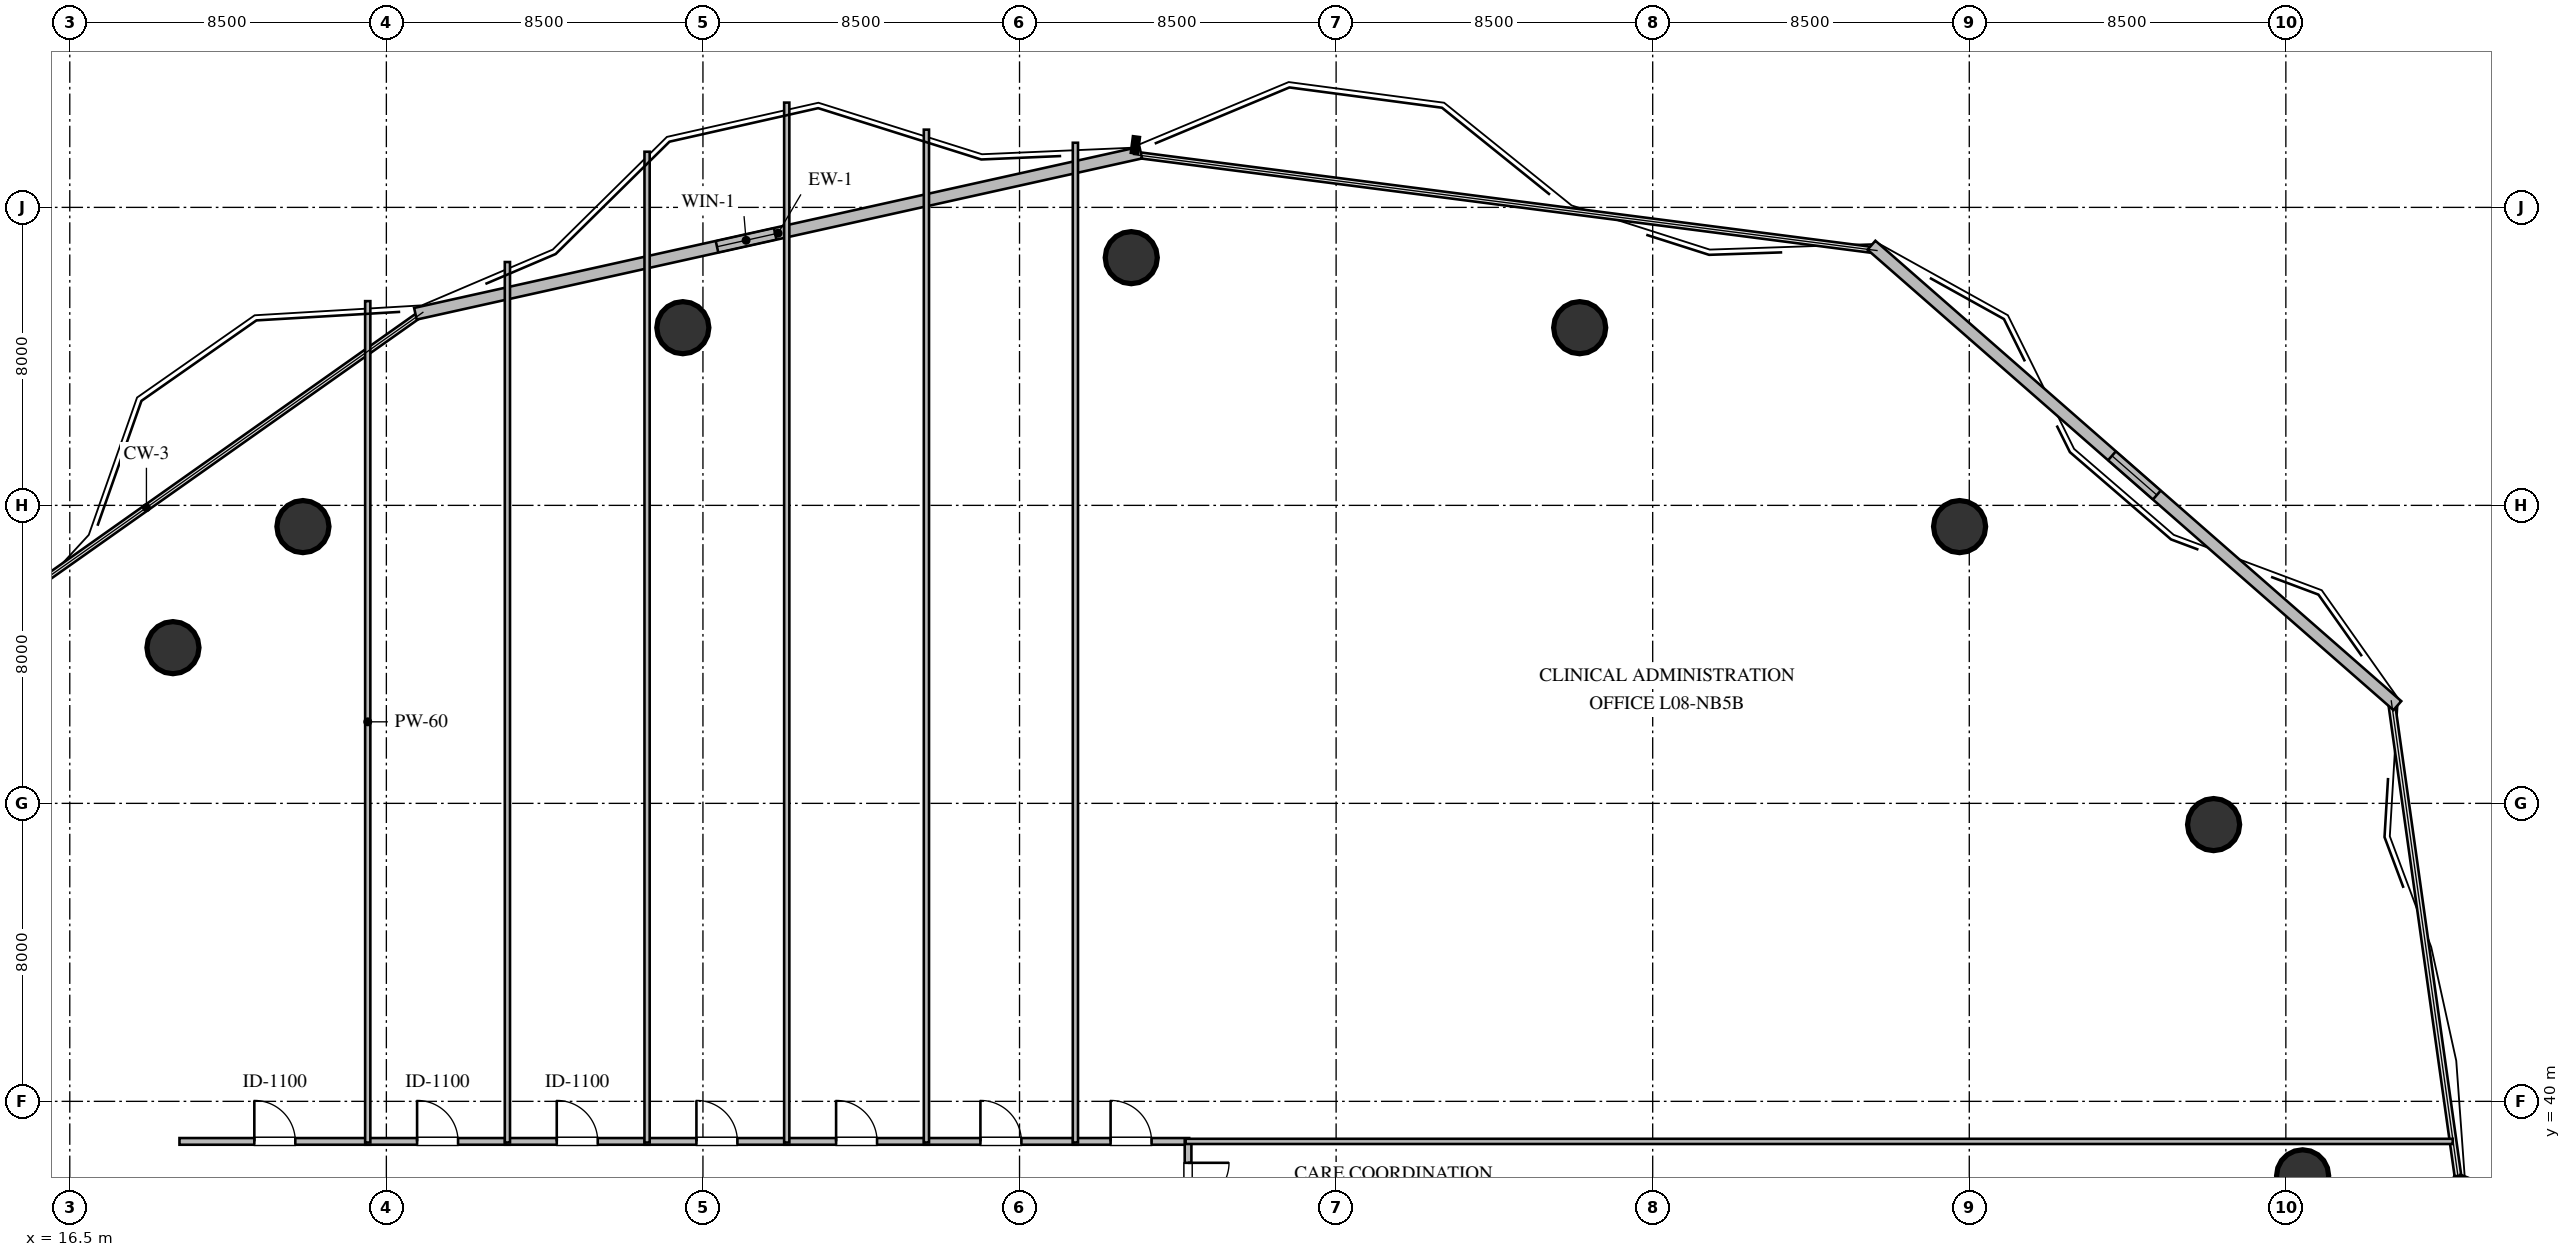
"""IFC4 building model, lengths in metres.
Left out: names, types, materials, properties, quantities, classifications, styles, units other than length and angle.
Written with IfcOpenShell. Run it as: python <this file> out.ifc"""

import sys

from ifc_helpers import new_model, si_unit, direction, frame, frame_2d, origin, origin_2d, place, context, subcontext, project, spatial, rectangle, circle, extrude, element, fill, save


model = new_model("IFC4")
c1 = context("Model", 3, precision=1e-05, world=origin(), true_north=direction((0.0, 1.0)))
c2 = subcontext(c1, "Body", "Model", "MODEL_VIEW")
j1 = project(units=[si_unit("LENGTHUNIT", "METRE"), si_unit("PLANEANGLEUNIT", "RADIAN")], contexts=[c1])
p1 = place(None, origin())
s1 = spatial("IfcSite", under=j1, at=p1, CompositionType="ELEMENT")
p2 = place(p1, origin())
s2 = spatial("IfcBuilding", under=s1, at=p2, CompositionType="ELEMENT")
p3 = place(p2, frame((0.0, 0.0, 34.8)))
s3 = spatial("IfcBuildingStorey", under=s2, at=p3, CompositionType="ELEMENT", Elevation=34.8)
for number, where, z_axis, x_axis in (
    (1, (76.45, 38.0, 0.0), (0.0, 0.0, 1.0), (1.0, 0.0, 0.0)),
    (2, (74.06, 47.43, 0.0), (0.0, 0.0, 1.0), (1.0, 0.0, 0.0)),
    (3, (67.24, 55.43, 0.0), (0.0, 0.0, 1.0), (1.0, 0.0, 0.0)),
    (4, (57.04, 60.77, 0.0), (0.0, 0.0, 1.0), (1.0, 0.0, 0.0)),
    (5, (45.0, 62.65, 0.0), (0.0, 0.0, 1.0), (1.0, 0.0, 0.0)),
    (6, (32.96, 60.77, 0.0), (0.0, 0.0, 1.0), (1.0, 0.0, 0.0)),
    (7, (22.76, 55.43, 0.0), (0.0, 0.0, 1.0), (1.0, 0.0, 0.0)),
    (8, (19.27, 52.18, 0.0), (0.0, 0.0, 1.0), (1.0, 0.0, 0.0)),
):
    element("IfcColumn", number, at=place(p3, frame(where, z_axis=z_axis, x_axis=x_axis)), inside=s3, PredefinedType="COLUMN", context=c2, shape_type="SweptSolid", body=[
        extrude(circle(Radius=0.7, at=origin_2d()), origin(), (0.0, 0.0, 1.0), 3.6),
    ])
p4 = place(p3, frame((25.78, 61.144, 0.0), z_axis=(0.0, 0.0, 1.0), x_axis=(0.976206349039, 0.216843639742, 0.0)))
e9 = element("IfcWall", 9, at=p4, inside=s3, PredefinedType="STANDARD", context=c2, shape_type="SweptSolid", body=[
    extrude(rectangle(XDim=19.949, YDim=0.32, at=frame_2d((9.975, 0.0))), origin(), (0.0, 0.0, 1.0), 3.36),
])
p5 = place(p4, frame((8.295, 0.0, 1.05)))
e10 = element("IfcOpeningElement", 10, at=p5, cuts=e9, PredefinedType="OPENING", context=c2, shape_type="SweptSolid", body=[
    extrude(rectangle(XDim=1.6, YDim=1.5, at=frame_2d((0.8, 0.75))), frame((0.0, 0.17, 0.0), z_axis=(0.0, -1.0, 0.0), x_axis=(1.0, 0.0, 0.0)), (0.0, 0.0, 1.0), 0.34),
])
p6 = place(p3, frame((64.874, 62.984, 0.0), z_axis=(0.0, 0.0, 1.0), x_axis=(0.752445311183, -0.658654730249, 0.0)))
e11 = element("IfcWall", 11, at=p6, inside=s3, PredefinedType="STANDARD", context=c2, shape_type="SweptSolid", body=[
    extrude(rectangle(XDim=18.765, YDim=0.32, at=frame_2d((9.383, 0.0))), origin(), (0.0, 0.0, 1.0), 3.36),
])
p7 = place(p6, frame((8.582, 0.0, 1.05)))
e12 = element("IfcOpeningElement", 12, at=p7, cuts=e11, PredefinedType="OPENING", context=c2, shape_type="SweptSolid", body=[
    extrude(rectangle(XDim=1.6, YDim=1.5, at=frame_2d((0.8, 0.75))), frame((0.0, 0.17, 0.0), z_axis=(0.0, -1.0, 0.0), x_axis=(1.0, 0.0, 0.0)), (0.0, 0.0, 1.0), 0.34),
])
p8 = place(p3, frame((19.445, 38.925, 0.0), z_axis=(0.0, 0.0, 1.0), x_axis=(1.0, 0.0, 0.0)))
e13 = element("IfcWall", 13, at=p8, inside=s3, PredefinedType="PARTITIONING", context=c2, shape_type="SweptSolid", body=[
    extrude(rectangle(XDim=5.12, YDim=0.18, at=frame_2d((2.56, 0.0))), origin(), (0.0, 0.0, 1.0), 3.36),
])
p9 = place(p8, frame((2.01, 0.0, 0.0)))
e14 = element("IfcOpeningElement", 14, at=p9, cuts=e13, PredefinedType="OPENING", context=c2, shape_type="SweptSolid", body=[
    extrude(rectangle(XDim=1.1, YDim=2.1, at=frame_2d((0.55, 1.05))), frame((0.0, 0.1, 0.0), z_axis=(0.0, -1.0, 0.0), x_axis=(1.0, 0.0, 0.0)), (0.0, 0.0, 1.0), 0.2),
])
p10 = place(p3, frame((24.435, 38.925, 0.0), z_axis=(0.0, 0.0, 1.0), x_axis=(1.0, 0.0, 0.0)))
e15 = element("IfcWall", 15, at=p10, inside=s3, PredefinedType="PARTITIONING", context=c2, shape_type="SweptSolid", body=[
    extrude(rectangle(XDim=3.88, YDim=0.18, at=frame_2d((1.94, 0.0))), origin(), (0.0, 0.0, 1.0), 3.36),
])
p11 = place(p10, frame((1.39, 0.0, 0.0)))
e16 = element("IfcOpeningElement", 16, at=p11, cuts=e15, PredefinedType="OPENING", context=c2, shape_type="SweptSolid", body=[
    extrude(rectangle(XDim=1.1, YDim=2.1, at=frame_2d((0.55, 1.05))), frame((0.0, 0.1, 0.0), z_axis=(0.0, -1.0, 0.0), x_axis=(1.0, 0.0, 0.0)), (0.0, 0.0, 1.0), 0.2),
])
p12 = place(p3, frame((28.185, 38.925, 0.0), z_axis=(0.0, 0.0, 1.0), x_axis=(1.0, 0.0, 0.0)))
e17 = element("IfcWall", 17, at=p12, inside=s3, PredefinedType="PARTITIONING", context=c2, shape_type="SweptSolid", body=[
    extrude(rectangle(XDim=3.88, YDim=0.18, at=frame_2d((1.94, 0.0))), origin(), (0.0, 0.0, 1.0), 3.36),
])
p13 = place(p12, frame((1.39, 0.0, 0.0)))
e18 = element("IfcOpeningElement", 18, at=p13, cuts=e17, PredefinedType="OPENING", context=c2, shape_type="SweptSolid", body=[
    extrude(rectangle(XDim=1.1, YDim=2.1, at=frame_2d((0.55, 1.05))), frame((0.0, 0.1, 0.0), z_axis=(0.0, -1.0, 0.0), x_axis=(1.0, 0.0, 0.0)), (0.0, 0.0, 1.0), 0.2),
])
p14 = place(p3, frame((31.935, 38.925, 0.0), z_axis=(0.0, 0.0, 1.0), x_axis=(1.0, 0.0, 0.0)))
e19 = element("IfcWall", 19, at=p14, inside=s3, PredefinedType="PARTITIONING", context=c2, shape_type="SweptSolid", body=[
    extrude(rectangle(XDim=3.88, YDim=0.18, at=frame_2d((1.94, 0.0))), origin(), (0.0, 0.0, 1.0), 3.36),
])
p15 = place(p14, frame((1.39, 0.0, 0.0)))
e20 = element("IfcOpeningElement", 20, at=p15, cuts=e19, PredefinedType="OPENING", context=c2, shape_type="SweptSolid", body=[
    extrude(rectangle(XDim=1.1, YDim=2.1, at=frame_2d((0.55, 1.05))), frame((0.0, 0.1, 0.0), z_axis=(0.0, -1.0, 0.0), x_axis=(1.0, 0.0, 0.0)), (0.0, 0.0, 1.0), 0.2),
])
p16 = place(p3, frame((35.685, 38.925, 0.0), z_axis=(0.0, 0.0, 1.0), x_axis=(1.0, 0.0, 0.0)))
e21 = element("IfcWall", 21, at=p16, inside=s3, PredefinedType="PARTITIONING", context=c2, shape_type="SweptSolid", body=[
    extrude(rectangle(XDim=3.88, YDim=0.18, at=frame_2d((1.94, 0.0))), origin(), (0.0, 0.0, 1.0), 3.36),
])
p17 = place(p16, frame((1.39, 0.0, 0.0)))
e22 = element("IfcOpeningElement", 22, at=p17, cuts=e21, PredefinedType="OPENING", context=c2, shape_type="SweptSolid", body=[
    extrude(rectangle(XDim=1.1, YDim=2.1, at=frame_2d((0.55, 1.05))), frame((0.0, 0.1, 0.0), z_axis=(0.0, -1.0, 0.0), x_axis=(1.0, 0.0, 0.0)), (0.0, 0.0, 1.0), 0.2),
])
p18 = place(p3, frame((39.435, 38.925, 0.0), z_axis=(0.0, 0.0, 1.0), x_axis=(1.0, 0.0, 0.0)))
e23 = element("IfcWall", 23, at=p18, inside=s3, PredefinedType="PARTITIONING", context=c2, shape_type="SweptSolid", body=[
    extrude(rectangle(XDim=4.13, YDim=0.18, at=frame_2d((2.065, 0.0))), origin(), (0.0, 0.0, 1.0), 3.36),
])
p19 = place(p18, frame((1.515, 0.0, 0.0)))
e24 = element("IfcOpeningElement", 24, at=p19, cuts=e23, PredefinedType="OPENING", context=c2, shape_type="SweptSolid", body=[
    extrude(rectangle(XDim=1.1, YDim=2.1, at=frame_2d((0.55, 1.05))), frame((0.0, 0.1, 0.0), z_axis=(0.0, -1.0, 0.0), x_axis=(1.0, 0.0, 0.0)), (0.0, 0.0, 1.0), 0.2),
])
p20 = place(p3, frame((43.435, 38.925, 0.0), z_axis=(0.0, 0.0, 1.0), x_axis=(1.0, 0.0, 0.0)))
e25 = element("IfcWall", 25, at=p20, inside=s3, PredefinedType="PARTITIONING", context=c2, shape_type="SweptSolid", body=[
    extrude(rectangle(XDim=3.12, YDim=0.18, at=frame_2d((1.56, 0.0))), origin(), (0.0, 0.0, 1.0), 3.36),
])
p21 = place(p20, frame((1.01, 0.0, 0.0)))
e26 = element("IfcOpeningElement", 26, at=p21, cuts=e25, PredefinedType="OPENING", context=c2, shape_type="SweptSolid", body=[
    extrude(rectangle(XDim=1.1, YDim=2.1, at=frame_2d((0.55, 1.05))), frame((0.0, 0.1, 0.0), z_axis=(0.0, -1.0, 0.0), x_axis=(1.0, 0.0, 0.0)), (0.0, 0.0, 1.0), 0.2),
])
p22 = place(p3, frame((46.525, 38.955, 0.0), z_axis=(0.0, 0.0, 1.0), x_axis=(0.0, -1.0, 0.0)))
e27 = element("IfcWall", 27, at=p22, inside=s3, PredefinedType="PARTITIONING", context=c2, shape_type="SweptSolid", body=[
    extrude(rectangle(XDim=2.31, YDim=0.18, at=frame_2d((1.155, 0.0))), origin(), (0.0, 0.0, 1.0), 3.36),
])
p23 = place(p22, frame((0.605, 0.0, 0.0)))
e28 = element("IfcOpeningElement", 28, at=p23, cuts=e27, PredefinedType="OPENING", context=c2, shape_type="SweptSolid", body=[
    extrude(rectangle(XDim=1.1, YDim=2.1, at=frame_2d((0.55, 1.05))), frame((0.0, 0.1, 0.0), z_axis=(0.0, -1.0, 0.0), x_axis=(1.0, 0.0, 0.0)), (0.0, 0.0, 1.0), 0.2),
])
p24 = place(p3, frame((24.5, 61.483, 0.0), z_axis=(0.0, 0.0, 1.0), x_axis=(0.0, -1.0, 0.0)))
e29 = element("IfcWall", 29, at=p24, inside=s3, PredefinedType="PARTITIONING", context=c2, shape_type="SweptSolid", body=[
    extrude(rectangle(XDim=22.588, YDim=0.14, at=frame_2d((11.294, 0.0))), origin(), (0.0, 0.0, 1.0), 3.36),
])
p25 = place(p3, frame((28.25, 62.533, 0.0), z_axis=(0.0, 0.0, 1.0), x_axis=(0.0, -1.0, 0.0)))
e30 = element("IfcWall", 30, at=p25, inside=s3, PredefinedType="PARTITIONING", context=c2, shape_type="SweptSolid", body=[
    extrude(rectangle(XDim=23.638, YDim=0.14, at=frame_2d((11.819, 0.0))), origin(), (0.0, 0.0, 1.0), 3.36),
])
p26 = place(p3, frame((32.0, 65.494, 0.0), z_axis=(0.0, 0.0, 1.0), x_axis=(0.0, -1.0, 0.0)))
e31 = element("IfcWall", 31, at=p26, inside=s3, PredefinedType="PARTITIONING", context=c2, shape_type="SweptSolid", body=[
    extrude(rectangle(XDim=26.599, YDim=0.14, at=frame_2d((13.299, 0.0))), origin(), (0.0, 0.0, 1.0), 2.806),
])
p27 = place(p3, frame((35.75, 66.813, 0.0), z_axis=(0.0, 0.0, 1.0), x_axis=(0.0, -1.0, 0.0)))
e32 = element("IfcWall", 32, at=p27, inside=s3, PredefinedType="PARTITIONING", context=c2, shape_type="SweptSolid", body=[
    extrude(rectangle(XDim=27.918, YDim=0.14, at=frame_2d((13.959, 0.0))), origin(), (0.0, 0.0, 1.0), 3.36),
])
p28 = place(p3, frame((39.5, 66.087, 0.0), z_axis=(0.0, 0.0, 1.0), x_axis=(0.0, -1.0, 0.0)))
e33 = element("IfcWall", 33, at=p28, inside=s3, PredefinedType="PARTITIONING", context=c2, shape_type="SweptSolid", body=[
    extrude(rectangle(XDim=27.192, YDim=0.14, at=frame_2d((13.596, 0.0))), origin(), (0.0, 0.0, 1.0), 3.36),
])
p29 = place(p3, frame((43.5, 65.735, 0.0), z_axis=(0.0, 0.0, 1.0), x_axis=(0.0, -1.0, 0.0)))
e34 = element("IfcWall", 34, at=p29, inside=s3, PredefinedType="PARTITIONING", context=c2, shape_type="SweptSolid", body=[
    extrude(rectangle(XDim=26.84, YDim=0.14, at=frame_2d((13.42, 0.0))), origin(), (0.0, 0.0, 1.0), 2.806),
])
p30 = place(p3, frame((80.48, 38.925, 0.0), z_axis=(0.0, 0.0, 1.0), x_axis=(-1.0, 0.0, 0.0)))
e35 = element("IfcWall", 35, at=p30, inside=s3, PredefinedType="PARTITIONING", context=c2, shape_type="SweptSolid", body=[
    extrude(rectangle(XDim=34.02, YDim=0.14, at=frame_2d((17.01, 0.0))), origin(), (0.0, 0.0, 1.0), 3.36),
])
p31 = place(p5, origin())
e36 = element("IfcWindow", 36, at=p31, inside=s3, PartitioningType="SINGLE_PANEL", PredefinedType="WINDOW", context=c2, shape_type="SweptSolid", body=[
    extrude(rectangle(XDim=1.6, YDim=1.5, at=frame_2d((0.8, 0.75))), frame((0.0, 0.03, 0.0), z_axis=(0.0, -1.0, 0.0), x_axis=(1.0, 0.0, 0.0)), (0.0, 0.0, 1.0), 0.06),
])
fill(e10, e36)
p32 = place(p7, origin())
e37 = element("IfcWindow", 37, at=p32, inside=s3, PartitioningType="SINGLE_PANEL", PredefinedType="WINDOW", context=c2, shape_type="SweptSolid", body=[
    extrude(rectangle(XDim=1.6, YDim=1.5, at=frame_2d((0.8, 0.75))), frame((0.0, 0.03, 0.0), z_axis=(0.0, -1.0, 0.0), x_axis=(1.0, 0.0, 0.0)), (0.0, 0.0, 1.0), 0.06),
])
fill(e12, e37)
p33 = place(p9, origin())
e38 = element("IfcDoor", 38, at=p33, inside=s3, OperationType="SINGLE_SWING_LEFT", PredefinedType="DOOR", context=c2, shape_type="SweptSolid", body=[
    extrude(rectangle(XDim=1.1, YDim=2.1, at=frame_2d((0.55, 1.05))), frame((0.0, 0.025, 0.0), z_axis=(0.0, -1.0, 0.0), x_axis=(1.0, 0.0, 0.0)), (0.0, 0.0, 1.0), 0.05),
])
fill(e14, e38)
p34 = place(p11, origin())
e39 = element("IfcDoor", 39, at=p34, inside=s3, OperationType="SINGLE_SWING_LEFT", PredefinedType="DOOR", context=c2, shape_type="SweptSolid", body=[
    extrude(rectangle(XDim=1.1, YDim=2.1, at=frame_2d((0.55, 1.05))), frame((0.0, 0.025, 0.0), z_axis=(0.0, -1.0, 0.0), x_axis=(1.0, 0.0, 0.0)), (0.0, 0.0, 1.0), 0.05),
])
fill(e16, e39)
p35 = place(p13, origin())
e40 = element("IfcDoor", 40, at=p35, inside=s3, OperationType="SINGLE_SWING_LEFT", PredefinedType="DOOR", context=c2, shape_type="SweptSolid", body=[
    extrude(rectangle(XDim=1.1, YDim=2.1, at=frame_2d((0.55, 1.05))), frame((0.0, 0.025, 0.0), z_axis=(0.0, -1.0, 0.0), x_axis=(1.0, 0.0, 0.0)), (0.0, 0.0, 1.0), 0.05),
])
fill(e18, e40)
p36 = place(p15, origin())
e41 = element("IfcDoor", 41, at=p36, inside=s3, OperationType="SINGLE_SWING_LEFT", PredefinedType="DOOR", context=c2, shape_type="SweptSolid", body=[
    extrude(rectangle(XDim=1.1, YDim=2.1, at=frame_2d((0.55, 1.05))), frame((0.0, 0.025, 0.0), z_axis=(0.0, -1.0, 0.0), x_axis=(1.0, 0.0, 0.0)), (0.0, 0.0, 1.0), 0.05),
])
fill(e20, e41)
p37 = place(p17, origin())
e42 = element("IfcDoor", 42, at=p37, inside=s3, OperationType="SINGLE_SWING_LEFT", PredefinedType="DOOR", context=c2, shape_type="SweptSolid", body=[
    extrude(rectangle(XDim=1.1, YDim=2.1, at=frame_2d((0.55, 1.05))), frame((0.0, 0.025, 0.0), z_axis=(0.0, -1.0, 0.0), x_axis=(1.0, 0.0, 0.0)), (0.0, 0.0, 1.0), 0.05),
])
fill(e22, e42)
p38 = place(p19, origin())
e43 = element("IfcDoor", 43, at=p38, inside=s3, OperationType="SINGLE_SWING_LEFT", PredefinedType="DOOR", context=c2, shape_type="SweptSolid", body=[
    extrude(rectangle(XDim=1.1, YDim=2.1, at=frame_2d((0.55, 1.05))), frame((0.0, 0.025, 0.0), z_axis=(0.0, -1.0, 0.0), x_axis=(1.0, 0.0, 0.0)), (0.0, 0.0, 1.0), 0.05),
])
fill(e24, e43)
p39 = place(p21, origin())
e44 = element("IfcDoor", 44, at=p39, inside=s3, OperationType="SINGLE_SWING_LEFT", PredefinedType="DOOR", context=c2, shape_type="SweptSolid", body=[
    extrude(rectangle(XDim=1.1, YDim=2.1, at=frame_2d((0.55, 1.05))), frame((0.0, 0.025, 0.0), z_axis=(0.0, -1.0, 0.0), x_axis=(1.0, 0.0, 0.0)), (0.0, 0.0, 1.0), 0.05),
])
fill(e26, e44)
p40 = place(p23, origin())
e45 = element("IfcDoor", 45, at=p40, inside=s3, OperationType="SINGLE_SWING_LEFT", PredefinedType="DOOR", context=c2, shape_type="SweptSolid", body=[
    extrude(rectangle(XDim=1.1, YDim=2.1, at=frame_2d((0.55, 1.05))), frame((0.0, 0.025, 0.0), z_axis=(0.0, -1.0, 0.0), x_axis=(1.0, 0.0, 0.0)), (0.0, 0.0, 1.0), 0.05),
])
fill(e28, e45)
save(model, sys.argv[1])
